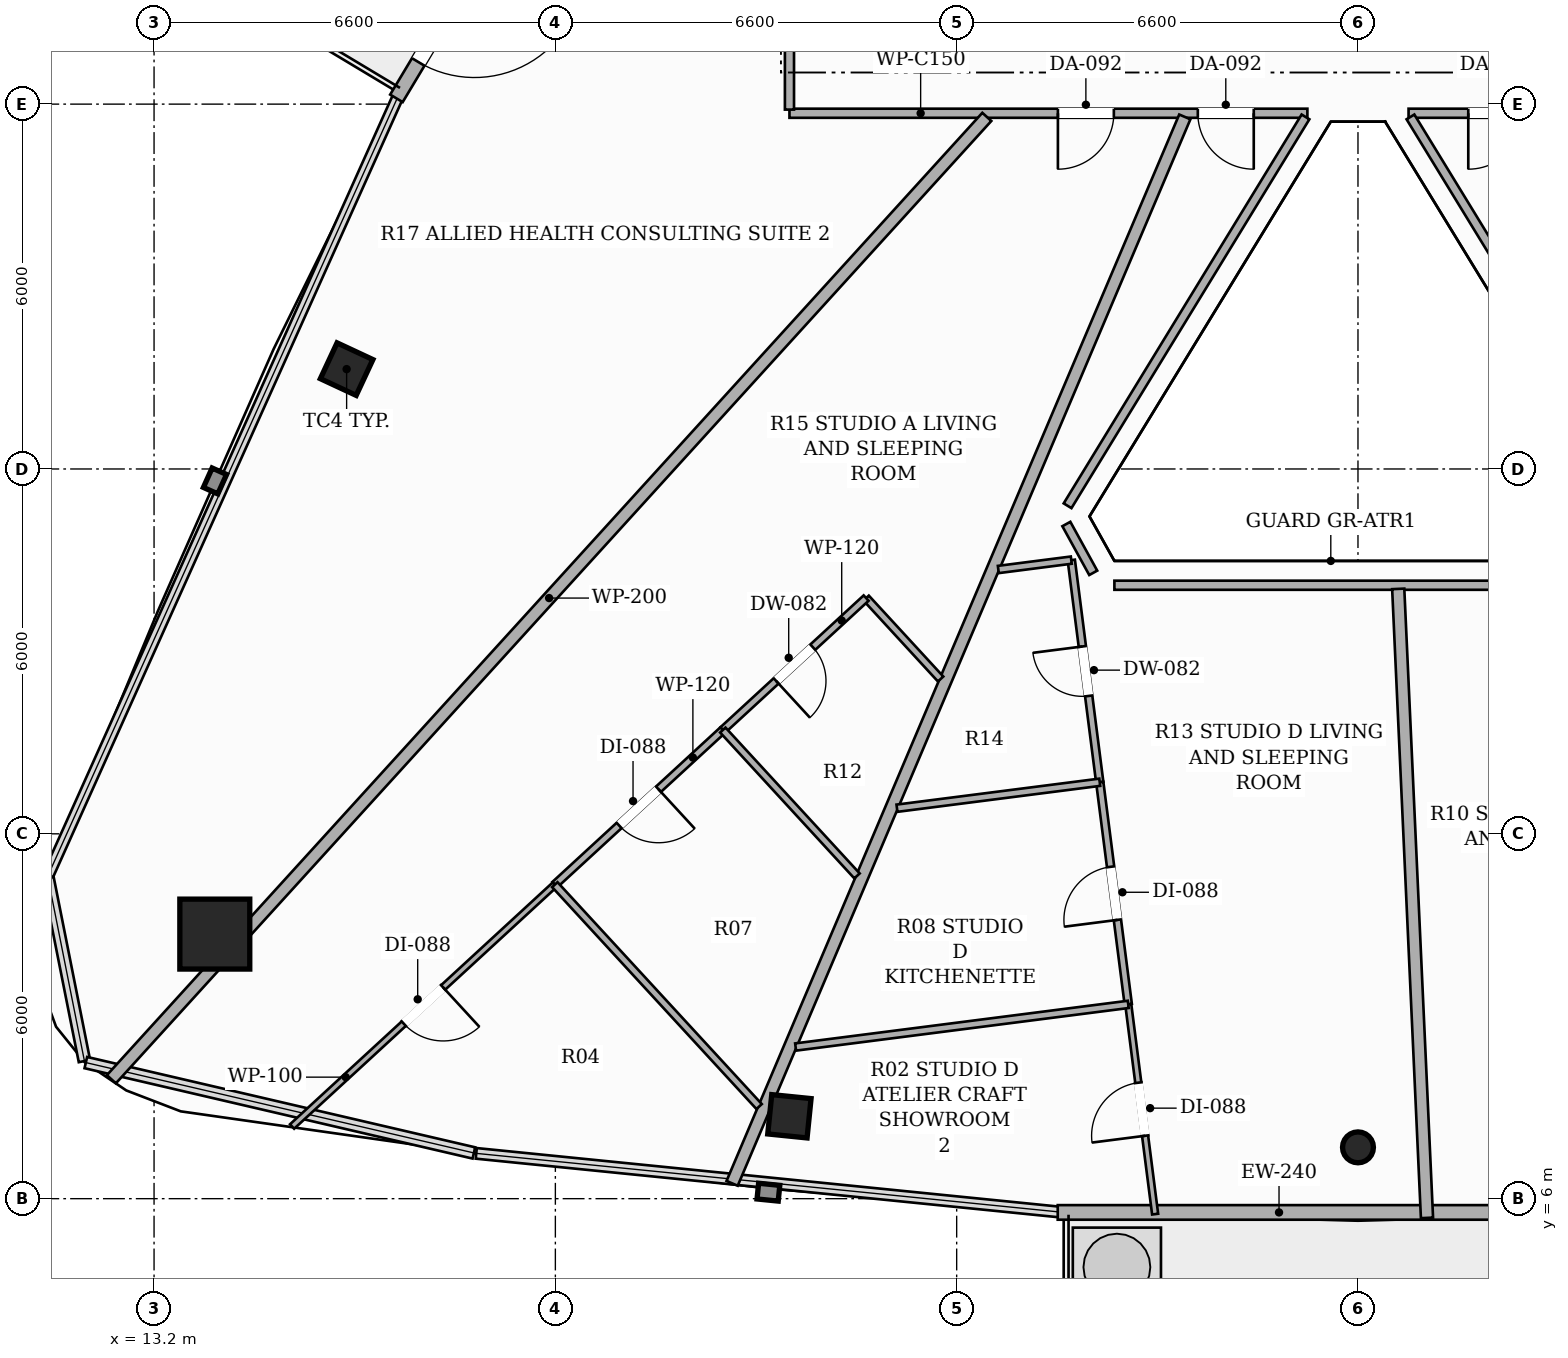
"""IFC4 building model, lengths in metres.
Left out: names, types, materials, properties, quantities, classifications, styles, units other than length and angle.
Written with IfcOpenShell. Run it as: python <this file> out.ifc"""

import sys

from ifc_helpers import new_model, si_unit, direction, frame, frame_2d, origin, origin_2d, place, context, subcontext, project, spatial, rectangle, hollow_rectangle, hollow_circle, extrude, element, fill, save


model = new_model("IFC4")
c1 = context("Model", 3, precision=1e-05, world=origin(), true_north=direction((0.0, 1.0)))
c2 = subcontext(c1, "Body", "Model", "MODEL_VIEW")
j1 = project(units=[si_unit("LENGTHUNIT", "METRE"), si_unit("PLANEANGLEUNIT", "RADIAN")], contexts=[c1])
p1 = place(None, origin())
s1 = spatial("IfcSite", under=j1, at=p1, CompositionType="ELEMENT")
p2 = place(p1, origin())
s2 = spatial("IfcBuilding", under=s1, at=p2, CompositionType="ELEMENT")
p3 = place(p2, frame((0.0, 0.0, 270.05)))
s3 = spatial("IfcBuildingStorey", under=s2, at=p3, CompositionType="ELEMENT", Elevation=270.05)
p4 = place(p3, frame((14.199, 10.351, 0.0), z_axis=(0.0, 0.0, 1.0), x_axis=(1.0, 0.0, 0.0)))
e1 = element("IfcColumn", 1, at=p4, inside=s3, PredefinedType="COLUMN", context=c2, shape_type="SweptSolid", body=[
    extrude(hollow_rectangle(XDim=1.15, YDim=1.15, WallThickness=0.036, at=origin_2d()), origin(), (0.0, 0.0, 1.0), 3.3),
])
for number, where, z_axis, x_axis in (
    (2, (16.367, 19.642, 0.0), (0.0, 0.0, 1.0), (0.423, 0.906, 0.0)),
    (3, (23.649, 7.355, 0.0), (0.0, 0.0, 1.0), (-0.995, 0.101, 0.0)),
):
    element("IfcColumn", number, at=place(p3, frame(where, z_axis=z_axis, x_axis=x_axis)), inside=s3, PredefinedType="COLUMN", context=c2, shape_type="SweptSolid", body=[
        extrude(hollow_rectangle(XDim=0.65, YDim=0.65, WallThickness=0.022, at=origin_2d()), origin(), (0.0, 0.0, 1.0), 3.3),
    ])
p5 = place(p3, frame((33.0, 6.844, 0.0), z_axis=(0.0, 0.0, 1.0), x_axis=(1.0, 0.0, 0.0)))
e4 = element("IfcColumn", 4, at=p5, inside=s3, PredefinedType="COLUMN", context=c2, shape_type="SweptSolid", body=[
    extrude(hollow_circle(Radius=0.254, WallThickness=0.016, at=origin_2d()), origin(), (0.0, 0.0, 1.0), 3.3),
])
p6 = place(p3, frame((22.094, 32.279, 0.0), z_axis=(0.0, 0.0, 1.0), x_axis=(-0.514303866757, -0.857608029719, 0.0)))
e5 = element("IfcWall", 5, at=p6, inside=s3, PredefinedType="SOLIDWALL", context=c2, shape_type="SweptSolid", body=[
    extrude(rectangle(XDim=9.543, YDim=0.24, at=frame_2d((4.771, 0.0))), origin(), (0.0, 0.0, 1.0), 2.624),
])
p7 = place(p6, frame((7.045, 0.0, 0.0)))
e6 = element("IfcOpeningElement", 6, at=p7, cuts=e5, PredefinedType="OPENING", context=c2, shape_type="SweptSolid", body=[
    extrude(rectangle(XDim=1.8, YDim=2.2, at=frame_2d((0.9, 1.1))), frame((0.0, 0.13, 0.0), z_axis=(0.0, -1.0, 0.0), x_axis=(1.0, 0.0, 0.0)), (0.0, 0.0, 1.0), 0.26),
])
p8 = place(p3, frame((28.062, 5.774, 0.0), z_axis=(0.0, 0.0, 1.0), x_axis=(1.0, 0.0, 0.0)))
e7 = element("IfcWall", 7, at=p8, inside=s3, PredefinedType="SOLIDWALL", context=c2, shape_type="SweptSolid", body=[
    extrude(rectangle(XDim=9.876, YDim=0.24, at=frame_2d((4.938, 0.0))), origin(), (0.0, 0.0, 1.0), 2.624),
])
p9 = place(p8, frame((7.379, 0.0, 0.0)))
e8 = element("IfcOpeningElement", 8, at=p9, cuts=e7, PredefinedType="OPENING", context=c2, shape_type="SweptSolid", body=[
    extrude(rectangle(XDim=1.8, YDim=2.2, at=frame_2d((0.9, 1.1))), frame((0.0, 0.13, 0.0), z_axis=(0.0, -1.0, 0.0), x_axis=(1.0, 0.0, 0.0)), (0.0, 0.0, 1.0), 0.26),
])
p10 = place(p3, frame((32.168, 23.85, 0.0), z_axis=(0.0, 0.0, 1.0), x_axis=(-1.0, 0.0, 0.0)))
e9 = element("IfcWall", 9, at=p10, inside=s3, PredefinedType="PARTITIONING", context=c2, shape_type="SweptSolid", body=[
    extrude(rectangle(XDim=8.518, YDim=0.15, at=frame_2d((4.259, 0.0))), origin(), (0.0, 0.0, 1.0), 2.565),
])
p11 = place(p10, frame((3.183, 0.0, 0.0)))
e10 = element("IfcOpeningElement", 10, at=p11, cuts=e9, PredefinedType="OPENING", context=c2, shape_type="SweptSolid", body=[
    extrude(rectangle(XDim=0.92, YDim=2.15, at=frame_2d((0.46, 1.075))), frame((0.0, 0.085, 0.0), z_axis=(0.0, -1.0, 0.0), x_axis=(1.0, 0.0, 0.0)), (0.0, 0.0, 1.0), 0.17),
])
p12 = place(p10, frame((0.882, 0.0, 0.0)))
e11 = element("IfcOpeningElement", 11, at=p12, cuts=e9, PredefinedType="OPENING", context=c2, shape_type="SweptSolid", body=[
    extrude(rectangle(XDim=0.92, YDim=2.15, at=frame_2d((0.46, 1.075))), frame((0.0, 0.085, 0.0), z_axis=(0.0, -1.0, 0.0), x_axis=(1.0, 0.0, 0.0)), (0.0, 0.0, 1.0), 0.17),
])
p13 = place(p3, frame((23.65, 23.91, 0.0), z_axis=(0.0, 0.0, 1.0), x_axis=(0.0, 1.0, 0.0)))
e12 = element("IfcWall", 12, at=p13, inside=s3, PredefinedType="PARTITIONING", context=c2, shape_type="SweptSolid", body=[
    extrude(rectangle(XDim=10.509, YDim=0.15, at=frame_2d((5.254, 0.0))), origin(), (0.0, 0.0, 1.0), 2.492),
])
p14 = place(p13, frame((4.814, 0.0, 0.0)))
e13 = element("IfcOpeningElement", 13, at=p14, cuts=e12, PredefinedType="OPENING", context=c2, shape_type="SweptSolid", body=[
    extrude(rectangle(XDim=0.88, YDim=2.1, at=frame_2d((0.44, 1.05))), frame((0.0, 0.085, 0.0), z_axis=(0.0, -1.0, 0.0), x_axis=(1.0, 0.0, 0.0)), (0.0, 0.0, 1.0), 0.17),
])
p15 = place(p3, frame((42.19, 23.85, 0.0), z_axis=(0.0, 0.0, 1.0), x_axis=(-1.0, 0.0, 0.0)))
e14 = element("IfcWall", 14, at=p15, inside=s3, PredefinedType="PARTITIONING", context=c2, shape_type="SweptSolid", body=[
    extrude(rectangle(XDim=8.358, YDim=0.15, at=frame_2d((4.179, 0.0))), origin(), (0.0, 0.0, 1.0), 2.565),
])
p16 = place(p15, frame((0.52, 0.0, 0.0)))
e15 = element("IfcOpeningElement", 15, at=p16, cuts=e14, PredefinedType="OPENING", context=c2, shape_type="SweptSolid", body=[
    extrude(rectangle(XDim=0.88, YDim=2.1, at=frame_2d((0.44, 1.05))), frame((0.0, 0.085, 0.0), z_axis=(0.0, -1.0, 0.0), x_axis=(1.0, 0.0, 0.0)), (0.0, 0.0, 1.0), 0.17),
])
p17 = place(p15, frame((3.757, 0.0, 0.0)))
e16 = element("IfcOpeningElement", 16, at=p17, cuts=e14, PredefinedType="OPENING", context=c2, shape_type="SweptSolid", body=[
    extrude(rectangle(XDim=0.92, YDim=2.15, at=frame_2d((0.46, 1.075))), frame((0.0, 0.085, 0.0), z_axis=(0.0, -1.0, 0.0), x_axis=(1.0, 0.0, 0.0)), (0.0, 0.0, 1.0), 0.17),
])
p18 = place(p15, frame((6.456, 0.0, 0.0)))
e17 = element("IfcOpeningElement", 17, at=p18, cuts=e14, PredefinedType="OPENING", context=c2, shape_type="SweptSolid", body=[
    extrude(rectangle(XDim=0.92, YDim=2.15, at=frame_2d((0.46, 1.075))), frame((0.0, 0.085, 0.0), z_axis=(0.0, -1.0, 0.0), x_axis=(1.0, 0.0, 0.0)), (0.0, 0.0, 1.0), 0.17),
])
p19 = place(p3, frame((33.863, 23.79, 0.0), z_axis=(0.0, 0.0, 1.0), x_axis=(0.521913594497, -0.852998358661, 0.0)))
e18 = element("IfcWall", 18, at=p19, inside=s3, PredefinedType="PARTITIONING", context=c2, shape_type="SweptSolid", body=[
    extrude(rectangle(XDim=7.497, YDim=0.15, at=frame_2d((3.749, 0.0))), origin(), (0.0, 0.0, 1.0), 2.773),
])
p20 = place(p3, frame((37.006, 16.088, 0.0), z_axis=(0.0, 0.0, 1.0), x_axis=(-1.0, 0.0, 0.0)))
e19 = element("IfcWall", 19, at=p20, inside=s3, PredefinedType="PARTITIONING", context=c2, shape_type="SweptSolid", body=[
    extrude(rectangle(XDim=8.012, YDim=0.15, at=frame_2d((4.006, 0.0))), origin(), (0.0, 0.0, 1.0), 2.773),
])
p21 = place(p3, frame((28.646, 16.292, 0.0), z_axis=(0.0, 0.0, 1.0), x_axis=(-0.482133469033, 0.876097778811, 0.0)))
e20 = element("IfcWall", 20, at=p21, inside=s3, PredefinedType="PARTITIONING", context=c2, shape_type="SweptSolid", body=[
    extrude(rectangle(XDim=0.917, YDim=0.15, at=frame_2d((0.458, 0.0))), origin(), (0.0, 0.0, 1.0), 3.06),
])
p22 = place(p3, frame((28.224, 17.395, 0.0), z_axis=(0.0, 0.0, 1.0), x_axis=(0.521913594497, 0.852998358661, 0.0)))
e21 = element("IfcWall", 21, at=p22, inside=s3, PredefinedType="PARTITIONING", context=c2, shape_type="SweptSolid", body=[
    extrude(rectangle(XDim=7.497, YDim=0.15, at=frame_2d((3.749, 0.0))), origin(), (0.0, 0.0, 1.0), 2.773),
])
p23 = place(p3, frame((26.896, 23.79, 0.0), z_axis=(0.0, 0.0, 1.0), x_axis=(-0.672947642337, -0.739690118004, 0.0)))
e22 = element("IfcWall", 22, at=p23, inside=s3, PredefinedType="PARTITIONING", context=c2, shape_type="SweptSolid", body=[
    extrude(rectangle(XDim=21.395, YDim=0.2, at=frame_2d((10.698, 0.0))), origin(), (0.0, 0.0, 1.0), 2.492),
])
p24 = place(p3, frame((30.152, 23.79, 0.0), z_axis=(0.0, 0.0, 1.0), x_axis=(-0.390757480658, -0.920493667175, 0.0)))
e23 = element("IfcWall", 23, at=p24, inside=s3, PredefinedType="PARTITIONING", context=c2, shape_type="SweptSolid", body=[
    extrude(rectangle(XDim=19.053, YDim=0.2, at=frame_2d((9.526, 0.0))), origin(), (0.0, 0.0, 1.0), 2.492),
])
p25 = place(p3, frame((34.135, 5.684, 0.0), z_axis=(0.0, 0.0, 1.0), x_axis=(-0.045669685987, 0.998956595545, 0.0)))
e24 = element("IfcWall", 24, at=p25, inside=s3, PredefinedType="PARTITIONING", context=c2, shape_type="SweptSolid", body=[
    extrude(rectangle(XDim=10.355, YDim=0.2, at=frame_2d((5.177, 0.0))), origin(), (0.0, 0.0, 1.0), 2.492),
])
p26 = place(p3, frame((26.136, 14.546, 0.0), z_axis=(0.0, 0.0, 1.0), x_axis=(-0.67721439392, 0.735785746443, 0.0)))
e25 = element("IfcWall", 25, at=p26, inside=s3, PredefinedType="PARTITIONING", context=c2, shape_type="SweptSolid", body=[
    extrude(rectangle(XDim=1.809, YDim=0.12, at=frame_2d((0.905, 0.0))), origin(), (0.0, 0.0, 1.0), 2.773),
])
p27 = place(p3, frame((24.911, 15.877, 0.0), z_axis=(0.0, 0.0, 1.0), x_axis=(-0.735690989841, -0.677317331438, 0.0)))
e26 = element("IfcWall", 26, at=p27, inside=s3, PredefinedType="PARTITIONING", context=c2, shape_type="SweptSolid", body=[
    extrude(rectangle(XDim=3.204, YDim=0.12, at=frame_2d((1.602, 0.0))), origin(), (0.0, 0.0, 1.0), 3.06),
])
p28 = place(p27, frame((1.192, 0.0, 0.0)))
e27 = element("IfcOpeningElement", 27, at=p28, cuts=e26, PredefinedType="OPENING", context=c2, shape_type="SweptSolid", body=[
    extrude(rectangle(XDim=0.82, YDim=2.1, at=frame_2d((0.41, 1.05))), frame((0.0, 0.07, 0.0), z_axis=(0.0, -1.0, 0.0), x_axis=(1.0, 0.0, 0.0)), (0.0, 0.0, 1.0), 0.14),
])
p29 = place(p3, frame((22.554, 13.707, 0.0), z_axis=(0.0, 0.0, 1.0), x_axis=(-0.735789751444, -0.677210042506, 0.0)))
e28 = element("IfcWall", 28, at=p29, inside=s3, PredefinedType="PARTITIONING", context=c2, shape_type="SweptSolid", body=[
    extrude(rectangle(XDim=3.755, YDim=0.12, at=frame_2d((1.877, 0.0))), origin(), (0.0, 0.0, 1.0), 2.773),
])
p30 = place(p29, frame((1.438, 0.0, 0.0)))
e29 = element("IfcOpeningElement", 29, at=p30, cuts=e28, PredefinedType="OPENING", context=c2, shape_type="SweptSolid", body=[
    extrude(rectangle(XDim=0.88, YDim=2.1, at=frame_2d((0.44, 1.05))), frame((0.0, 0.07, 0.0), z_axis=(0.0, -1.0, 0.0), x_axis=(1.0, 0.0, 0.0)), (0.0, 0.0, 1.0), 0.14),
])
p31 = place(p3, frame((19.791, 11.164, 0.0), z_axis=(0.0, 0.0, 1.0), x_axis=(-0.735787653784, -0.677212321608, 0.0)))
e30 = element("IfcWall", 30, at=p31, inside=s3, PredefinedType="PARTITIONING", context=c2, shape_type="SweptSolid", body=[
    extrude(rectangle(XDim=5.873, YDim=0.1, at=frame_2d((2.936, 0.0))), origin(), (0.0, 0.0, 1.0), 2.492),
])
p32 = place(p31, frame((2.496, 0.0, 0.0)))
e31 = element("IfcOpeningElement", 31, at=p32, cuts=e30, PredefinedType="OPENING", context=c2, shape_type="SweptSolid", body=[
    extrude(rectangle(XDim=0.88, YDim=2.1, at=frame_2d((0.44, 1.05))), frame((0.0, 0.06, 0.0), z_axis=(0.0, -1.0, 0.0), x_axis=(1.0, 0.0, 0.0)), (0.0, 0.0, 1.0), 0.12),
])
p33 = place(p3, frame((24.761, 11.308, 0.0), z_axis=(0.0, 0.0, 1.0), x_axis=(-0.677059775875, 0.735928026299, 0.0)))
e32 = element("IfcWall", 32, at=p33, inside=s3, PredefinedType="PARTITIONING", context=c2, shape_type="SweptSolid", body=[
    extrude(rectangle(XDim=3.26, YDim=0.12, at=frame_2d((1.63, 0.0))), origin(), (0.0, 0.0, 1.0), 2.773),
])
p34 = place(p3, frame((23.151, 7.515, 0.0), z_axis=(0.0, 0.0, 1.0), x_axis=(-0.677343302262, 0.735667078834, 0.0)))
e33 = element("IfcWall", 33, at=p34, inside=s3, PredefinedType="PARTITIONING", context=c2, shape_type="SweptSolid", body=[
    extrude(rectangle(XDim=4.96, YDim=0.12, at=frame_2d((2.48, 0.0))), origin(), (0.0, 0.0, 1.0), 2.492),
])
p35 = place(p3, frame((28.753, 12.848, 0.0), z_axis=(0.0, 0.0, 1.0), x_axis=(-0.127077358501, 0.991892809207, 0.0)))
e34 = element("IfcWall", 34, at=p35, inside=s3, PredefinedType="PARTITIONING", context=c2, shape_type="SweptSolid", body=[
    extrude(rectangle(XDim=3.683, YDim=0.12, at=frame_2d((1.841, 0.0))), origin(), (0.0, 0.0, 1.0), 2.773),
])
p36 = place(p35, frame((1.431, 0.0, 0.0)))
e35 = element("IfcOpeningElement", 35, at=p36, cuts=e34, PredefinedType="OPENING", context=c2, shape_type="SweptSolid", body=[
    extrude(rectangle(XDim=0.82, YDim=2.1, at=frame_2d((0.41, 1.05))), frame((0.0, 0.07, 0.0), z_axis=(0.0, -1.0, 0.0), x_axis=(1.0, 0.0, 0.0)), (0.0, 0.0, 1.0), 0.14),
])
p37 = place(p3, frame((28.285, 16.501, 0.0), z_axis=(0.0, 0.0, 1.0), x_axis=(-0.991859459137, -0.127337399535, 0.0)))
e36 = element("IfcWall", 36, at=p37, inside=s3, PredefinedType="PARTITIONING", context=c2, shape_type="SweptSolid", body=[
    extrude(rectangle(XDim=1.21, YDim=0.12, at=frame_2d((0.605, 0.0))), origin(), (0.0, 0.0, 1.0), 3.06),
])
p38 = place(p3, frame((29.222, 9.195, 0.0), z_axis=(0.0, 0.0, 1.0), x_axis=(-0.127346594916, 0.991858278568, 0.0)))
e37 = element("IfcWall", 37, at=p38, inside=s3, PredefinedType="PARTITIONING", context=c2, shape_type="SweptSolid", body=[
    extrude(rectangle(XDim=3.683, YDim=0.12, at=frame_2d((1.841, 0.0))), origin(), (0.0, 0.0, 1.0), 2.773),
])
p39 = place(p38, frame((1.401, 0.0, 0.0)))
e38 = element("IfcOpeningElement", 38, at=p39, cuts=e37, PredefinedType="OPENING", context=c2, shape_type="SweptSolid", body=[
    extrude(rectangle(XDim=0.88, YDim=2.1, at=frame_2d((0.44, 1.05))), frame((0.0, 0.07, 0.0), z_axis=(0.0, -1.0, 0.0), x_axis=(1.0, 0.0, 0.0)), (0.0, 0.0, 1.0), 0.14),
])
p40 = place(p3, frame((29.664, 5.746, 0.0), z_axis=(0.0, 0.0, 1.0), x_axis=(-0.127153688826, 0.991883027084, 0.0)))
e39 = element("IfcWall", 39, at=p40, inside=s3, PredefinedType="PARTITIONING", context=c2, shape_type="SweptSolid", body=[
    extrude(rectangle(XDim=3.477, YDim=0.1, at=frame_2d((1.739, 0.0))), origin(), (0.0, 0.0, 1.0), 2.492),
])
p41 = place(p40, frame((1.299, 0.0, 0.0)))
e40 = element("IfcOpeningElement", 40, at=p41, cuts=e39, PredefinedType="OPENING", context=c2, shape_type="SweptSolid", body=[
    extrude(rectangle(XDim=0.88, YDim=2.1, at=frame_2d((0.44, 1.05))), frame((0.0, 0.06, 0.0), z_axis=(0.0, -1.0, 0.0), x_axis=(1.0, 0.0, 0.0)), (0.0, 0.0, 1.0), 0.12),
])
p42 = place(p3, frame((28.753, 12.848, 0.0), z_axis=(0.0, 0.0, 1.0), x_axis=(-0.991902552373, -0.127001285805, 0.0)))
e41 = element("IfcWall", 41, at=p42, inside=s3, PredefinedType="PARTITIONING", context=c2, shape_type="SweptSolid", body=[
    extrude(rectangle(XDim=3.362, YDim=0.12, at=frame_2d((1.681, 0.0))), origin(), (0.0, 0.0, 1.0), 2.773),
])
p43 = place(p3, frame((29.222, 9.195, 0.0), z_axis=(0.0, 0.0, 1.0), x_axis=(-0.991886960484, -0.127123001942, 0.0)))
e42 = element("IfcWall", 42, at=p43, inside=s3, PredefinedType="PARTITIONING", context=c2, shape_type="SweptSolid", body=[
    extrude(rectangle(XDim=5.516, YDim=0.12, at=frame_2d((2.758, 0.0))), origin(), (0.0, 0.0, 1.0), 2.773),
])
p44 = place(p7, origin())
e43 = element("IfcDoor", 43, at=p44, inside=s3, OperationType="SINGLE_SWING_LEFT", PredefinedType="DOOR", context=c2, shape_type="SweptSolid", body=[
    extrude(rectangle(XDim=1.8, YDim=2.2, at=frame_2d((0.9, 1.1))), frame((0.0, 0.025, 0.0), z_axis=(0.0, -1.0, 0.0), x_axis=(1.0, 0.0, 0.0)), (0.0, 0.0, 1.0), 0.05),
])
fill(e6, e43)
p45 = place(p11, origin())
e44 = element("IfcDoor", 44, at=p45, inside=s3, OperationType="SINGLE_SWING_RIGHT", PredefinedType="DOOR", context=c2, shape_type="SweptSolid", body=[
    extrude(rectangle(XDim=0.92, YDim=2.15, at=frame_2d((0.46, 1.075))), frame((0.0, 0.025, 0.0), z_axis=(0.0, -1.0, 0.0), x_axis=(1.0, 0.0, 0.0)), (0.0, 0.0, 1.0), 0.05),
])
fill(e10, e44)
p46 = place(p28, origin())
e45 = element("IfcDoor", 45, at=p46, inside=s3, OperationType="SINGLE_SWING_RIGHT", PredefinedType="DOOR", context=c2, shape_type="SweptSolid", body=[
    extrude(rectangle(XDim=0.82, YDim=2.1, at=frame_2d((0.41, 1.05))), frame((0.0, 0.025, 0.0), z_axis=(0.0, -1.0, 0.0), x_axis=(1.0, 0.0, 0.0)), (0.0, 0.0, 1.0), 0.05),
])
fill(e27, e45)
p47 = place(p30, origin())
e46 = element("IfcDoor", 46, at=p47, inside=s3, OperationType="SINGLE_SWING_LEFT", PredefinedType="DOOR", context=c2, shape_type="SweptSolid", body=[
    extrude(rectangle(XDim=0.88, YDim=2.1, at=frame_2d((0.44, 1.05))), frame((0.0, 0.025, 0.0), z_axis=(0.0, -1.0, 0.0), x_axis=(1.0, 0.0, 0.0)), (0.0, 0.0, 1.0), 0.05),
])
fill(e29, e46)
p48 = place(p32, origin())
e47 = element("IfcDoor", 47, at=p48, inside=s3, OperationType="SINGLE_SWING_LEFT", PredefinedType="DOOR", context=c2, shape_type="SweptSolid", body=[
    extrude(rectangle(XDim=0.88, YDim=2.1, at=frame_2d((0.44, 1.05))), frame((0.0, 0.025, 0.0), z_axis=(0.0, -1.0, 0.0), x_axis=(1.0, 0.0, 0.0)), (0.0, 0.0, 1.0), 0.05),
])
fill(e31, e47)
p49 = place(p18, origin())
e48 = element("IfcDoor", 48, at=p49, inside=s3, OperationType="SINGLE_SWING_RIGHT", PredefinedType="DOOR", context=c2, shape_type="SweptSolid", body=[
    extrude(rectangle(XDim=0.92, YDim=2.15, at=frame_2d((0.46, 1.075))), frame((0.0, 0.025, 0.0), z_axis=(0.0, -1.0, 0.0), x_axis=(1.0, 0.0, 0.0)), (0.0, 0.0, 1.0), 0.05),
])
fill(e17, e48)
p50 = place(p12, origin())
e49 = element("IfcDoor", 49, at=p50, inside=s3, OperationType="SINGLE_SWING_LEFT", PredefinedType="DOOR", context=c2, shape_type="SweptSolid", body=[
    extrude(rectangle(XDim=0.92, YDim=2.15, at=frame_2d((0.46, 1.075))), frame((0.0, 0.025, 0.0), z_axis=(0.0, -1.0, 0.0), x_axis=(1.0, 0.0, 0.0)), (0.0, 0.0, 1.0), 0.05),
])
fill(e11, e49)
p51 = place(p36, origin())
e50 = element("IfcDoor", 50, at=p51, inside=s3, OperationType="SINGLE_SWING_RIGHT", PredefinedType="DOOR", context=c2, shape_type="SweptSolid", body=[
    extrude(rectangle(XDim=0.82, YDim=2.1, at=frame_2d((0.41, 1.05))), frame((0.0, 0.025, 0.0), z_axis=(0.0, -1.0, 0.0), x_axis=(1.0, 0.0, 0.0)), (0.0, 0.0, 1.0), 0.05),
])
fill(e35, e50)
p52 = place(p39, origin())
e51 = element("IfcDoor", 51, at=p52, inside=s3, OperationType="SINGLE_SWING_LEFT", PredefinedType="DOOR", context=c2, shape_type="SweptSolid", body=[
    extrude(rectangle(XDim=0.88, YDim=2.1, at=frame_2d((0.44, 1.05))), frame((0.0, 0.025, 0.0), z_axis=(0.0, -1.0, 0.0), x_axis=(1.0, 0.0, 0.0)), (0.0, 0.0, 1.0), 0.05),
])
fill(e38, e51)
p53 = place(p41, origin())
e52 = element("IfcDoor", 52, at=p53, inside=s3, OperationType="SINGLE_SWING_LEFT", PredefinedType="DOOR", context=c2, shape_type="SweptSolid", body=[
    extrude(rectangle(XDim=0.88, YDim=2.1, at=frame_2d((0.44, 1.05))), frame((0.0, 0.025, 0.0), z_axis=(0.0, -1.0, 0.0), x_axis=(1.0, 0.0, 0.0)), (0.0, 0.0, 1.0), 0.05),
])
fill(e40, e52)
save(model, sys.argv[1])
